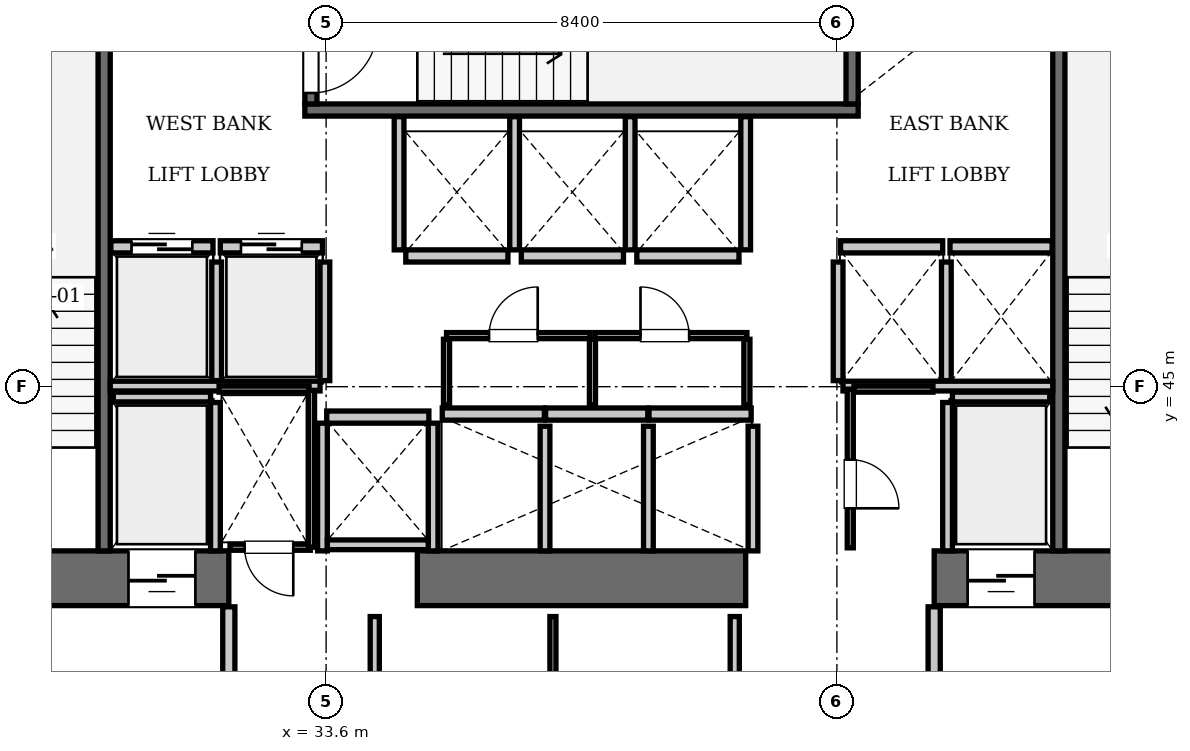
"""IFC4 building model, lengths in metres.
Left out: names, types, materials, properties, quantities, classifications, styles, units other than length and angle.
Written with IfcOpenShell. Run it as: python <this file> out.ifc"""

import sys

from ifc_helpers import new_model, si_unit, direction, frame, frame_2d, origin, place, context, subcontext, project, spatial, rectangle, extrude, element, fill, save


model = new_model("IFC4")
c1 = context("Model", 3, precision=1e-05, world=origin(), true_north=direction((0.0, 1.0)))
c2 = subcontext(c1, "Body", "Model", "MODEL_VIEW")
j1 = project(units=[si_unit("LENGTHUNIT", "METRE"), si_unit("PLANEANGLEUNIT", "RADIAN")], contexts=[c1])
p1 = place(None, origin())
s1 = spatial("IfcSite", under=j1, at=p1, CompositionType="ELEMENT")
p2 = place(p1, origin())
s2 = spatial("IfcBuilding", under=s1, at=p2, CompositionType="ELEMENT")
p3 = place(p2, frame((0.0, 0.0, 38.5)))
s3 = spatial("IfcBuildingStorey", under=s2, at=p3, CompositionType="ELEMENT", Elevation=38.5)
p4 = place(p3, frame((25.2, 41.85, 0.0), z_axis=(0.0, 0.0, 1.0), x_axis=(1.0, 0.0, 0.0)))
e1 = element("IfcWall", 1, at=p4, inside=s3, PredefinedType="SHEAR", context=c2, shape_type="SweptSolid", body=[
    extrude(rectangle(XDim=6.8, YDim=0.9, at=frame_2d((3.4, 0.0))), origin(), (0.0, 0.0, 1.0), 3.85),
])
p5 = place(p4, frame((1.65, 0.0, 0.0)))
e2 = element("IfcOpeningElement", 2, at=p5, cuts=e1, PredefinedType="OPENING", context=c2, shape_type="SweptSolid", body=[
    extrude(rectangle(XDim=1.15, YDim=2.15, at=frame_2d((0.575, 1.075))), frame((0.0, 0.46, 0.0), z_axis=(0.0, -1.0, 0.0), x_axis=(1.0, 0.0, 0.0)), (0.0, 0.0, 1.0), 0.92),
])
p6 = place(p4, frame((5.15, 0.0, 0.0)))
e3 = element("IfcOpeningElement", 3, at=p6, cuts=e1, PredefinedType="OPENING", context=c2, shape_type="SweptSolid", body=[
    extrude(rectangle(XDim=1.1, YDim=2.2, at=frame_2d((0.55, 1.1))), frame((0.0, 0.46, 0.0), z_axis=(0.0, -1.0, 0.0), x_axis=(1.0, 0.0, 0.0)), (0.0, 0.0, 1.0), 0.92),
])
p7 = place(p3, frame((35.1, 41.85, 0.0), z_axis=(0.0, 0.0, 1.0), x_axis=(1.0, 0.0, 0.0)))
e4 = element("IfcWall", 4, at=p7, inside=s3, PredefinedType="SHEAR", context=c2, shape_type="SweptSolid", body=[
    extrude(rectangle(XDim=5.4, YDim=0.9, at=frame_2d((2.7, 0.0))), origin(), (0.0, 0.0, 1.0), 3.85),
])
p8 = place(p3, frame((43.6, 41.85, 0.0), z_axis=(0.0, 0.0, 1.0), x_axis=(1.0, 0.0, 0.0)))
e5 = element("IfcWall", 5, at=p8, inside=s3, PredefinedType="SHEAR", context=c2, shape_type="SweptSolid", body=[
    extrude(rectangle(XDim=6.8, YDim=0.9, at=frame_2d((3.4, 0.0))), origin(), (0.0, 0.0, 1.0), 3.85),
])
p9 = place(p8, frame((3.9, 0.0, 0.0)))
e6 = element("IfcOpeningElement", 6, at=p9, cuts=e5, PredefinedType="OPENING", context=c2, shape_type="SweptSolid", body=[
    extrude(rectangle(XDim=1.15, YDim=2.15, at=frame_2d((0.575, 1.075))), frame((0.0, 0.46, 0.0), z_axis=(0.0, -1.0, 0.0), x_axis=(1.0, 0.0, 0.0)), (0.0, 0.0, 1.0), 0.92),
])
p10 = place(p8, frame((0.55, 0.0, 0.0)))
e7 = element("IfcOpeningElement", 7, at=p10, cuts=e5, PredefinedType="OPENING", context=c2, shape_type="SweptSolid", body=[
    extrude(rectangle(XDim=1.1, YDim=2.2, at=frame_2d((0.55, 1.1))), frame((0.0, 0.46, 0.0), z_axis=(0.0, -1.0, 0.0), x_axis=(1.0, 0.0, 0.0)), (0.0, 0.0, 1.0), 0.92),
])
p11 = place(p3, frame((29.95, 42.3, 0.0), z_axis=(0.0, 0.0, 1.0), x_axis=(0.0, 1.0, 0.0)))
e8 = element("IfcWall", 8, at=p11, inside=s3, PredefinedType="SOLIDWALL", context=c2, shape_type="SweptSolid", body=[
    extrude(rectangle(XDim=8.85, YDim=0.2, at=frame_2d((4.425, 0.0))), origin(), (0.0, 0.0, 1.0), 3.61),
])
p12 = place(p3, frame((33.25, 49.55, 0.0), z_axis=(0.0, 0.0, 1.0), x_axis=(1.0, 0.0, 0.0)))
e9 = element("IfcWall", 9, at=p12, inside=s3, PredefinedType="SOLIDWALL", context=c2, shape_type="SweptSolid", body=[
    extrude(rectangle(XDim=9.1, YDim=0.2, at=frame_2d((4.55, 0.0))), origin(), (0.0, 0.0, 1.0), 3.61),
])
p13 = place(p3, frame((42.25, 49.65, 0.0), z_axis=(0.0, 0.0, 1.0), x_axis=(0.0, 1.0, 0.0)))
e10 = element("IfcWall", 10, at=p13, inside=s3, PredefinedType="SOLIDWALL", context=c2, shape_type="SweptSolid", body=[
    extrude(rectangle(XDim=3.45, YDim=0.2, at=frame_2d((1.725, 0.0))), origin(), (0.0, 0.0, 1.0), 3.61),
])
p14 = place(p3, frame((33.35, 49.65, 0.0), z_axis=(0.0, 0.0, 1.0), x_axis=(0.0, 1.0, 0.0)))
e11 = element("IfcWall", 11, at=p14, inside=s3, PredefinedType="SOLIDWALL", context=c2, shape_type="SweptSolid", body=[
    extrude(rectangle(XDim=3.45, YDim=0.2, at=frame_2d((1.725, 0.0))), origin(), (0.0, 0.0, 1.0), 3.61),
])
p15 = place(p14, frame((0.18, 0.0, 0.0)))
e12 = element("IfcOpeningElement", 12, at=p15, cuts=e11, PredefinedType="OPENING", context=c2, shape_type="SweptSolid", body=[
    extrude(rectangle(XDim=1.1, YDim=2.15, at=frame_2d((0.55, 1.075))), frame((0.0, 0.11, 0.0), z_axis=(0.0, -1.0, 0.0), x_axis=(1.0, 0.0, 0.0)), (0.0, 0.0, 1.0), 0.22),
])
p16 = place(p3, frame((45.65, 42.3, 0.0), z_axis=(0.0, 0.0, 1.0), x_axis=(0.0, 1.0, 0.0)))
e13 = element("IfcWall", 13, at=p16, inside=s3, PredefinedType="SOLIDWALL", context=c2, shape_type="SweptSolid", body=[
    extrude(rectangle(XDim=8.85, YDim=0.2, at=frame_2d((4.425, 0.0))), origin(), (0.0, 0.0, 1.0), 3.61),
])
p17 = place(p3, frame((30.06, 47.3, 0.0), z_axis=(0.0, 0.0, 1.0), x_axis=(1.0, 0.0, 0.0)))
e14 = element("IfcWall", 14, at=p17, inside=s3, PredefinedType="SOLIDWALL", context=c2, shape_type="SweptSolid", body=[
    extrude(rectangle(XDim=1.68, YDim=0.2, at=frame_2d((0.84, 0.0))), origin(), (0.0, 0.0, 1.0), 3.61),
])
p18 = place(p17, frame((0.34, 0.0, 0.0)))
e15 = element("IfcOpeningElement", 15, at=p18, cuts=e14, PredefinedType="OPENING", context=c2, shape_type="SweptSolid", body=[
    extrude(rectangle(XDim=1.0, YDim=2.15, at=frame_2d((0.5, 1.075))), frame((0.0, 0.11, 0.0), z_axis=(0.0, -1.0, 0.0), x_axis=(1.0, 0.0, 0.0)), (0.0, 0.0, 1.0), 0.22),
])
p19 = place(p3, frame((31.86, 47.3, 0.0), z_axis=(0.0, 0.0, 1.0), x_axis=(1.0, 0.0, 0.0)))
e16 = element("IfcWall", 16, at=p19, inside=s3, PredefinedType="SOLIDWALL", context=c2, shape_type="SweptSolid", body=[
    extrude(rectangle(XDim=1.68, YDim=0.2, at=frame_2d((0.84, 0.0))), origin(), (0.0, 0.0, 1.0), 3.61),
])
p20 = place(p19, frame((0.34, 0.0, 0.0)))
e17 = element("IfcOpeningElement", 17, at=p20, cuts=e16, PredefinedType="OPENING", context=c2, shape_type="SweptSolid", body=[
    extrude(rectangle(XDim=1.0, YDim=2.15, at=frame_2d((0.5, 1.075))), frame((0.0, 0.11, 0.0), z_axis=(0.0, -1.0, 0.0), x_axis=(1.0, 0.0, 0.0)), (0.0, 0.0, 1.0), 0.22),
])
for number, where, z_axis, x_axis in (
    (18, (42.06, 47.3, 0.0), (0.0, 0.0, 1.0), (1.0, 0.0, 0.0)),
    (19, (43.86, 47.3, 0.0), (0.0, 0.0, 1.0), (1.0, 0.0, 0.0)),
    (20, (35.51, 44.55, 0.0), (0.0, 0.0, 1.0), (1.0, 0.0, 0.0)),
    (21, (37.21, 44.55, 0.0), (0.0, 0.0, 1.0), (1.0, 0.0, 0.0)),
):
    element("IfcWall", number, at=place(p3, frame(where, z_axis=z_axis, x_axis=x_axis)), inside=s3, PredefinedType="SOLIDWALL", context=c2, shape_type="SweptSolid", body=[
        extrude(rectangle(XDim=1.68, YDim=0.2, at=frame_2d((0.84, 0.0))), origin(), (0.0, 0.0, 1.0), 3.61),
    ])
for number, where, z_axis, x_axis in (
    (22, (38.91, 44.55, 0.0), (0.0, 0.0, 1.0), (1.0, 0.0, 0.0)),
    (23, (34.91, 47.15, 0.0), (0.0, 0.0, 1.0), (1.0, 0.0, 0.0)),
):
    element("IfcWall", number, at=place(p3, frame(where, z_axis=z_axis, x_axis=x_axis)), inside=s3, PredefinedType="SOLIDWALL", context=c2, shape_type="SweptSolid", body=[
        extrude(rectangle(XDim=1.68, YDim=0.2, at=frame_2d((0.84, 0.0))), origin(), (0.0, 0.0, 1.0), 3.61),
    ])
for number, where, z_axis, x_axis in (
    (24, (36.81, 47.15, 0.0), (0.0, 0.0, 1.0), (1.0, 0.0, 0.0)),
    (25, (38.71, 47.15, 0.0), (0.0, 0.0, 1.0), (1.0, 0.0, 0.0)),
    (26, (33.61, 44.5, 0.0), (0.0, 0.0, 1.0), (1.0, 0.0, 0.0)),
):
    element("IfcWall", number, at=place(p3, frame(where, z_axis=z_axis, x_axis=x_axis)), inside=s3, PredefinedType="SOLIDWALL", context=c2, shape_type="SweptSolid", body=[
        extrude(rectangle(XDim=1.68, YDim=0.2, at=frame_2d((0.84, 0.0))), origin(), (0.0, 0.0, 1.0), 3.61),
    ])
p21 = place(p3, frame((30.1, 44.83, 0.0), z_axis=(0.0, 0.0, 1.0), x_axis=(1.0, 0.0, 0.0)))
e27 = element("IfcWall", 27, at=p21, inside=s3, PredefinedType="SOLIDWALL", context=c2, shape_type="SweptSolid", body=[
    extrude(rectangle(XDim=1.6, YDim=0.16, at=frame_2d((0.8, 0.0))), origin(), (0.0, 0.0, 1.0), 3.61),
])
p22 = place(p3, frame((31.78, 42.3, 0.0), z_axis=(0.0, 0.0, 1.0), x_axis=(0.0, 1.0, 0.0)))
e28 = element("IfcWall", 28, at=p22, inside=s3, PredefinedType="SOLIDWALL", context=c2, shape_type="SweptSolid", body=[
    extrude(rectangle(XDim=2.44, YDim=0.16, at=frame_2d((1.22, 0.0))), origin(), (0.0, 0.0, 1.0), 3.61),
])
p23 = place(p3, frame((43.9, 44.83, 0.0), z_axis=(0.0, 0.0, 1.0), x_axis=(1.0, 0.0, 0.0)))
e29 = element("IfcWall", 29, at=p23, inside=s3, PredefinedType="SOLIDWALL", context=c2, shape_type="SweptSolid", body=[
    extrude(rectangle(XDim=1.6, YDim=0.16, at=frame_2d((0.8, 0.0))), origin(), (0.0, 0.0, 1.0), 3.61),
])
p24 = place(p3, frame((43.82, 42.3, 0.0), z_axis=(0.0, 0.0, 1.0), x_axis=(0.0, 1.0, 0.0)))
e30 = element("IfcWall", 30, at=p24, inside=s3, PredefinedType="SOLIDWALL", context=c2, shape_type="SweptSolid", body=[
    extrude(rectangle(XDim=2.44, YDim=0.16, at=frame_2d((1.22, 0.0))), origin(), (0.0, 0.0, 1.0), 3.61),
])
for number, where, z_axis, x_axis in (
    (31, (31.8, 45.1, 0.0), (0.0, 0.0, 1.0), (0.0, 1.0, 0.0)),
    (32, (33.58, 45.1, 0.0), (0.0, 0.0, 1.0), (0.0, 1.0, 0.0)),
):
    element("IfcWall", number, at=place(p3, frame(where, z_axis=z_axis, x_axis=x_axis)), inside=s3, PredefinedType="SOLIDWALL", context=c2, shape_type="SweptSolid", body=[
        extrude(rectangle(XDim=1.95, YDim=0.16, at=frame_2d((0.975, 0.0))), origin(), (0.0, 0.0, 1.0), 3.61),
    ])
p25 = place(p3, frame((30.05, 45.01, 0.0), z_axis=(0.0, 0.0, 1.0), x_axis=(1.0, 0.0, 0.0)))
e33 = element("IfcWall", 33, at=p25, inside=s3, PredefinedType="SOLIDWALL", context=c2, shape_type="SweptSolid", body=[
    extrude(rectangle(XDim=3.45, YDim=0.16, at=frame_2d((1.725, 0.0))), origin(), (0.0, 0.0, 1.0), 3.61),
])
for number, where, z_axis, x_axis in (
    (34, (42.02, 45.1, 0.0), (0.0, 0.0, 1.0), (0.0, 1.0, 0.0)),
    (35, (43.8, 45.1, 0.0), (0.0, 0.0, 1.0), (0.0, 1.0, 0.0)),
):
    element("IfcWall", number, at=place(p3, frame(where, z_axis=z_axis, x_axis=x_axis)), inside=s3, PredefinedType="SOLIDWALL", context=c2, shape_type="SweptSolid", body=[
        extrude(rectangle(XDim=1.95, YDim=0.16, at=frame_2d((0.975, 0.0))), origin(), (0.0, 0.0, 1.0), 3.61),
    ])
p26 = place(p3, frame((42.1, 45.01, 0.0), z_axis=(0.0, 0.0, 1.0), x_axis=(1.0, 0.0, 0.0)))
e36 = element("IfcWall", 36, at=p26, inside=s3, PredefinedType="SOLIDWALL", context=c2, shape_type="SweptSolid", body=[
    extrude(rectangle(XDim=3.45, YDim=0.16, at=frame_2d((1.725, 0.0))), origin(), (0.0, 0.0, 1.0), 3.61),
])
for number, where, z_axis, x_axis in (
    (37, (37.2, 42.3, 0.0), (0.0, 0.0, 1.0), (0.0, 1.0, 0.0)),
    (38, (38.9, 42.3, 0.0), (0.0, 0.0, 1.0), (0.0, 1.0, 0.0)),
    (39, (40.62, 42.3, 0.0), (0.0, 0.0, 1.0), (0.0, 1.0, 0.0)),
):
    element("IfcWall", number, at=place(p3, frame(where, z_axis=z_axis, x_axis=x_axis)), inside=s3, PredefinedType="SOLIDWALL", context=c2, shape_type="SweptSolid", body=[
        extrude(rectangle(XDim=2.05, YDim=0.16, at=frame_2d((1.025, 0.0))), origin(), (0.0, 0.0, 1.0), 3.61),
    ])
for number, where, z_axis, x_axis in (
    (40, (34.8, 47.25, 0.0), (0.0, 0.0, 1.0), (0.0, 1.0, 0.0)),
    (41, (36.7, 47.25, 0.0), (0.0, 0.0, 1.0), (0.0, 1.0, 0.0)),
    (42, (38.6, 47.25, 0.0), (0.0, 0.0, 1.0), (0.0, 1.0, 0.0)),
    (43, (40.5, 47.25, 0.0), (0.0, 0.0, 1.0), (0.0, 1.0, 0.0)),
):
    element("IfcWall", number, at=place(p3, frame(where, z_axis=z_axis, x_axis=x_axis)), inside=s3, PredefinedType="SOLIDWALL", context=c2, shape_type="SweptSolid", body=[
        extrude(rectangle(XDim=2.19, YDim=0.16, at=frame_2d((1.095, 0.0))), origin(), (0.0, 0.0, 1.0), 3.61),
    ])
for number, where, z_axis, x_axis in (
    (44, (33.54, 42.3, 0.0), (0.0, 0.0, 1.0), (0.0, 1.0, 0.0)),
    (45, (35.36, 42.3, 0.0), (0.0, 0.0, 1.0), (0.0, 1.0, 0.0)),
):
    element("IfcWall", number, at=place(p3, frame(where, z_axis=z_axis, x_axis=x_axis)), inside=s3, PredefinedType="SOLIDWALL", context=c2, shape_type="SweptSolid", body=[
        extrude(rectangle(XDim=2.1, YDim=0.16, at=frame_2d((1.05, 0.0))), origin(), (0.0, 0.0, 1.0), 3.61),
    ])
p27 = place(p3, frame((33.62, 42.4, 0.0), z_axis=(0.0, 0.0, 1.0), x_axis=(1.0, 0.0, 0.0)))
e46 = element("IfcWall", 46, at=p27, inside=s3, PredefinedType="SOLIDWALL", context=c2, shape_type="SweptSolid", body=[
    extrude(rectangle(XDim=1.66, YDim=0.16, at=frame_2d((0.83, 0.0))), origin(), (0.0, 0.0, 1.0), 3.61),
])
for number, where, z_axis, x_axis in (
    (47, (32.0, 38.31, 0.0), (0.0, 0.0, 1.0), (0.0, 1.0, 0.0)),
    (48, (43.6, 38.31, 0.0), (0.0, 0.0, 1.0), (0.0, 1.0, 0.0)),
):
    element("IfcWall", number, at=place(p3, frame(where, z_axis=z_axis, x_axis=x_axis)), inside=s3, PredefinedType="PARTITIONING", context=c2, shape_type="SweptSolid", body=[
        extrude(rectangle(XDim=3.07, YDim=0.2, at=frame_2d((1.535, 0.0))), origin(), (0.0, 0.0, 1.0), 3.61),
    ])
p28 = place(p3, frame((32.02, 42.36, 0.0), z_axis=(0.0, 0.0, 1.0), x_axis=(1.0, 0.0, 0.0)))
e49 = element("IfcWall", 49, at=p28, inside=s3, PredefinedType="PARTITIONING", context=c2, shape_type="SweptSolid", body=[
    extrude(rectangle(XDim=1.32, YDim=0.1, at=frame_2d((0.66, 0.0))), origin(), (0.0, 0.0, 1.0), 3.61),
])
p29 = place(p28, frame((0.24, 0.0, 0.0)))
e50 = element("IfcOpeningElement", 50, at=p29, cuts=e49, PredefinedType="OPENING", context=c2, shape_type="SweptSolid", body=[
    extrude(rectangle(XDim=0.8, YDim=2.05, at=frame_2d((0.4, 1.025))), frame((0.0, 0.06, 0.0), z_axis=(0.0, -1.0, 0.0), x_axis=(1.0, 0.0, 0.0)), (0.0, 0.0, 1.0), 0.12),
])
p30 = place(p3, frame((31.84, 44.96, 0.0), z_axis=(0.0, 0.0, 1.0), x_axis=(1.0, 0.0, 0.0)))
e51 = element("IfcWall", 51, at=p30, inside=s3, PredefinedType="PARTITIONING", context=c2, shape_type="SweptSolid", body=[
    extrude(rectangle(XDim=1.48, YDim=0.1, at=frame_2d((0.74, 0.0))), origin(), (0.0, 0.0, 1.0), 3.61),
])
p31 = place(p3, frame((33.36, 42.36, 0.0), z_axis=(0.0, 0.0, 1.0), x_axis=(0.0, 1.0, 0.0)))
e52 = element("IfcWall", 52, at=p31, inside=s3, PredefinedType="PARTITIONING", context=c2, shape_type="SweptSolid", body=[
    extrude(rectangle(XDim=2.58, YDim=0.1, at=frame_2d((1.29, 0.0))), origin(), (0.0, 0.0, 1.0), 3.61),
])
p32 = place(p3, frame((35.58, 45.84, 0.0), z_axis=(0.0, 0.0, 1.0), x_axis=(1.0, 0.0, 0.0)))
e53 = element("IfcWall", 53, at=p32, inside=s3, PredefinedType="PARTITIONING", context=c2, shape_type="SweptSolid", body=[
    extrude(rectangle(XDim=2.36, YDim=0.1, at=frame_2d((1.18, 0.0))), origin(), (0.0, 0.0, 1.0), 3.61),
])
p33 = place(p32, frame((0.7, 0.0, 0.0)))
e54 = element("IfcOpeningElement", 54, at=p33, cuts=e53, PredefinedType="OPENING", context=c2, shape_type="SweptSolid", body=[
    extrude(rectangle(XDim=0.8, YDim=2.05, at=frame_2d((0.4, 1.025))), frame((0.0, 0.06, 0.0), z_axis=(0.0, -1.0, 0.0), x_axis=(1.0, 0.0, 0.0)), (0.0, 0.0, 1.0), 0.12),
])
p34 = place(p3, frame((38.02, 45.84, 0.0), z_axis=(0.0, 0.0, 1.0), x_axis=(1.0, 0.0, 0.0)))
e55 = element("IfcWall", 55, at=p34, inside=s3, PredefinedType="PARTITIONING", context=c2, shape_type="SweptSolid", body=[
    extrude(rectangle(XDim=2.5, YDim=0.1, at=frame_2d((1.25, 0.0))), origin(), (0.0, 0.0, 1.0), 3.61),
])
p35 = place(p34, frame((0.75, 0.0, 0.0)))
e56 = element("IfcOpeningElement", 56, at=p35, cuts=e55, PredefinedType="OPENING", context=c2, shape_type="SweptSolid", body=[
    extrude(rectangle(XDim=0.8, YDim=2.05, at=frame_2d((0.4, 1.025))), frame((0.0, 0.06, 0.0), z_axis=(0.0, -1.0, 0.0), x_axis=(1.0, 0.0, 0.0)), (0.0, 0.0, 1.0), 0.12),
])
for number, where, z_axis, x_axis in (
    (57, (35.58, 44.7, 0.0), (0.0, 0.0, 1.0), (0.0, 1.0, 0.0)),
    (58, (37.98, 44.7, 0.0), (0.0, 0.0, 1.0), (0.0, 1.0, 0.0)),
    (59, (40.52, 44.7, 0.0), (0.0, 0.0, 1.0), (0.0, 1.0, 0.0)),
):
    element("IfcWall", number, at=place(p3, frame(where, z_axis=z_axis, x_axis=x_axis)), inside=s3, PredefinedType="PARTITIONING", context=c2, shape_type="SweptSolid", body=[
        extrude(rectangle(XDim=1.08, YDim=0.1, at=frame_2d((0.54, 0.0))), origin(), (0.0, 0.0, 1.0), 3.61),
    ])
p36 = place(p3, frame((42.22, 42.35, 0.0), z_axis=(0.0, 0.0, 1.0), x_axis=(0.0, 1.0, 0.0)))
e60 = element("IfcWall", 60, at=p36, inside=s3, PredefinedType="PARTITIONING", context=c2, shape_type="SweptSolid", body=[
    extrude(rectangle(XDim=2.61, YDim=0.1, at=frame_2d((1.305, 0.0))), origin(), (0.0, 0.0, 1.0), 3.61),
])
p37 = place(p36, frame((0.65, 0.0, 0.0)))
e61 = element("IfcOpeningElement", 61, at=p37, cuts=e60, PredefinedType="OPENING", context=c2, shape_type="SweptSolid", body=[
    extrude(rectangle(XDim=0.8, YDim=2.05, at=frame_2d((0.4, 1.025))), frame((0.0, 0.06, 0.0), z_axis=(0.0, -1.0, 0.0), x_axis=(1.0, 0.0, 0.0)), (0.0, 0.0, 1.0), 0.12),
])
p38 = place(p3, frame((42.28, 44.96, 0.0), z_axis=(0.0, 0.0, 1.0), x_axis=(1.0, 0.0, 0.0)))
e62 = element("IfcWall", 62, at=p38, inside=s3, PredefinedType="PARTITIONING", context=c2, shape_type="SweptSolid", body=[
    extrude(rectangle(XDim=1.3, YDim=0.1, at=frame_2d((0.65, 0.0))), origin(), (0.0, 0.0, 1.0), 3.61),
])
p39 = place(p3, frame((34.4, 38.38, 0.0), z_axis=(0.0, 0.0, 1.0), x_axis=(0.0, 1.0, 0.0)))
e63 = element("IfcWall", 63, at=p39, inside=s3, PredefinedType="PARTITIONING", context=c2, shape_type="SweptSolid", body=[
    extrude(rectangle(XDim=2.84, YDim=0.15, at=frame_2d((1.42, 0.0))), origin(), (0.0, 0.0, 1.0), 3.61),
])
p40 = place(p3, frame((37.33, 38.38, 0.0), z_axis=(0.0, 0.0, 1.0), x_axis=(0.0, 1.0, 0.0)))
e64 = element("IfcWall", 64, at=p40, inside=s3, PredefinedType="PARTITIONING", context=c2, shape_type="SweptSolid", body=[
    extrude(rectangle(XDim=2.84, YDim=0.1, at=frame_2d((1.42, 0.0))), origin(), (0.0, 0.0, 1.0), 3.61),
])
p41 = place(p3, frame((40.32, 38.38, 0.0), z_axis=(0.0, 0.0, 1.0), x_axis=(0.0, 1.0, 0.0)))
e65 = element("IfcWall", 65, at=p41, inside=s3, PredefinedType="PARTITIONING", context=c2, shape_type="SweptSolid", body=[
    extrude(rectangle(XDim=2.84, YDim=0.15, at=frame_2d((1.42, 0.0))), origin(), (0.0, 0.0, 1.0), 3.61),
])
p42 = place(p15, frame((1.1, 0.0, 0.0), z_axis=(0.0, 0.0, 1.0), x_axis=(-1.0, 0.0, 0.0)))
e66 = element("IfcDoor", 66, at=p42, inside=s3, OperationType="SINGLE_SWING_LEFT", PredefinedType="DOOR", context=c2, shape_type="SweptSolid", body=[
    extrude(rectangle(XDim=1.1, YDim=2.15, at=frame_2d((0.55, 1.075))), frame((0.0, 0.025, 0.0), z_axis=(0.0, -1.0, 0.0), x_axis=(1.0, 0.0, 0.0)), (0.0, 0.0, 1.0), 0.05),
])
fill(e12, e66)
p43 = place(p18, origin())
e67 = element("IfcDoor", 67, at=p43, inside=s3, OperationType="SLIDING_TO_LEFT", PredefinedType="DOOR", context=c2, shape_type="SweptSolid", body=[
    extrude(rectangle(XDim=1.0, YDim=2.15, at=frame_2d((0.5, 1.075))), frame((0.0, 0.025, 0.0), z_axis=(0.0, -1.0, 0.0), x_axis=(1.0, 0.0, 0.0)), (0.0, 0.0, 1.0), 0.05),
])
fill(e15, e67)
p44 = place(p20, origin())
e68 = element("IfcDoor", 68, at=p44, inside=s3, OperationType="SLIDING_TO_LEFT", PredefinedType="DOOR", context=c2, shape_type="SweptSolid", body=[
    extrude(rectangle(XDim=1.0, YDim=2.15, at=frame_2d((0.5, 1.075))), frame((0.0, 0.025, 0.0), z_axis=(0.0, -1.0, 0.0), x_axis=(1.0, 0.0, 0.0)), (0.0, 0.0, 1.0), 0.05),
])
fill(e17, e68)
p45 = place(p6, frame((1.1, 0.0, 0.0), z_axis=(0.0, 0.0, 1.0), x_axis=(-1.0, 0.0, 0.0)))
e69 = element("IfcDoor", 69, at=p45, inside=s3, OperationType="SLIDING_TO_LEFT", PredefinedType="DOOR", context=c2, shape_type="SweptSolid", body=[
    extrude(rectangle(XDim=1.1, YDim=2.2, at=frame_2d((0.55, 1.1))), frame((0.0, 0.025, 0.0), z_axis=(0.0, -1.0, 0.0), x_axis=(1.0, 0.0, 0.0)), (0.0, 0.0, 1.0), 0.05),
])
fill(e3, e69)
p46 = place(p10, frame((1.1, 0.0, 0.0), z_axis=(0.0, 0.0, 1.0), x_axis=(-1.0, 0.0, 0.0)))
e70 = element("IfcDoor", 70, at=p46, inside=s3, OperationType="SLIDING_TO_LEFT", PredefinedType="DOOR", context=c2, shape_type="SweptSolid", body=[
    extrude(rectangle(XDim=1.1, YDim=2.2, at=frame_2d((0.55, 1.1))), frame((0.0, 0.025, 0.0), z_axis=(0.0, -1.0, 0.0), x_axis=(1.0, 0.0, 0.0)), (0.0, 0.0, 1.0), 0.05),
])
fill(e7, e70)
p47 = place(p29, frame((0.8, 0.0, 0.0), z_axis=(0.0, 0.0, 1.0), x_axis=(-1.0, 0.0, 0.0)))
e71 = element("IfcDoor", 71, at=p47, inside=s3, OperationType="SINGLE_SWING_LEFT", PredefinedType="DOOR", context=c2, shape_type="SweptSolid", body=[
    extrude(rectangle(XDim=0.8, YDim=2.05, at=frame_2d((0.4, 1.025))), frame((0.0, 0.025, 0.0), z_axis=(0.0, -1.0, 0.0), x_axis=(1.0, 0.0, 0.0)), (0.0, 0.0, 1.0), 0.05),
])
fill(e50, e71)
p48 = place(p33, origin())
e72 = element("IfcDoor", 72, at=p48, inside=s3, OperationType="SINGLE_SWING_RIGHT", PredefinedType="DOOR", context=c2, shape_type="SweptSolid", body=[
    extrude(rectangle(XDim=0.8, YDim=2.05, at=frame_2d((0.4, 1.025))), frame((0.0, 0.025, 0.0), z_axis=(0.0, -1.0, 0.0), x_axis=(1.0, 0.0, 0.0)), (0.0, 0.0, 1.0), 0.05),
])
fill(e54, e72)
p49 = place(p35, origin())
e73 = element("IfcDoor", 73, at=p49, inside=s3, OperationType="SINGLE_SWING_LEFT", PredefinedType="DOOR", context=c2, shape_type="SweptSolid", body=[
    extrude(rectangle(XDim=0.8, YDim=2.05, at=frame_2d((0.4, 1.025))), frame((0.0, 0.025, 0.0), z_axis=(0.0, -1.0, 0.0), x_axis=(1.0, 0.0, 0.0)), (0.0, 0.0, 1.0), 0.05),
])
fill(e56, e73)
p50 = place(p37, frame((0.8, 0.0, 0.0), z_axis=(0.0, 0.0, 1.0), x_axis=(-1.0, 0.0, 0.0)))
e74 = element("IfcDoor", 74, at=p50, inside=s3, OperationType="SINGLE_SWING_RIGHT", PredefinedType="DOOR", context=c2, shape_type="SweptSolid", body=[
    extrude(rectangle(XDim=0.8, YDim=2.05, at=frame_2d((0.4, 1.025))), frame((0.0, 0.025, 0.0), z_axis=(0.0, -1.0, 0.0), x_axis=(1.0, 0.0, 0.0)), (0.0, 0.0, 1.0), 0.05),
])
fill(e61, e74)
save(model, sys.argv[1])
